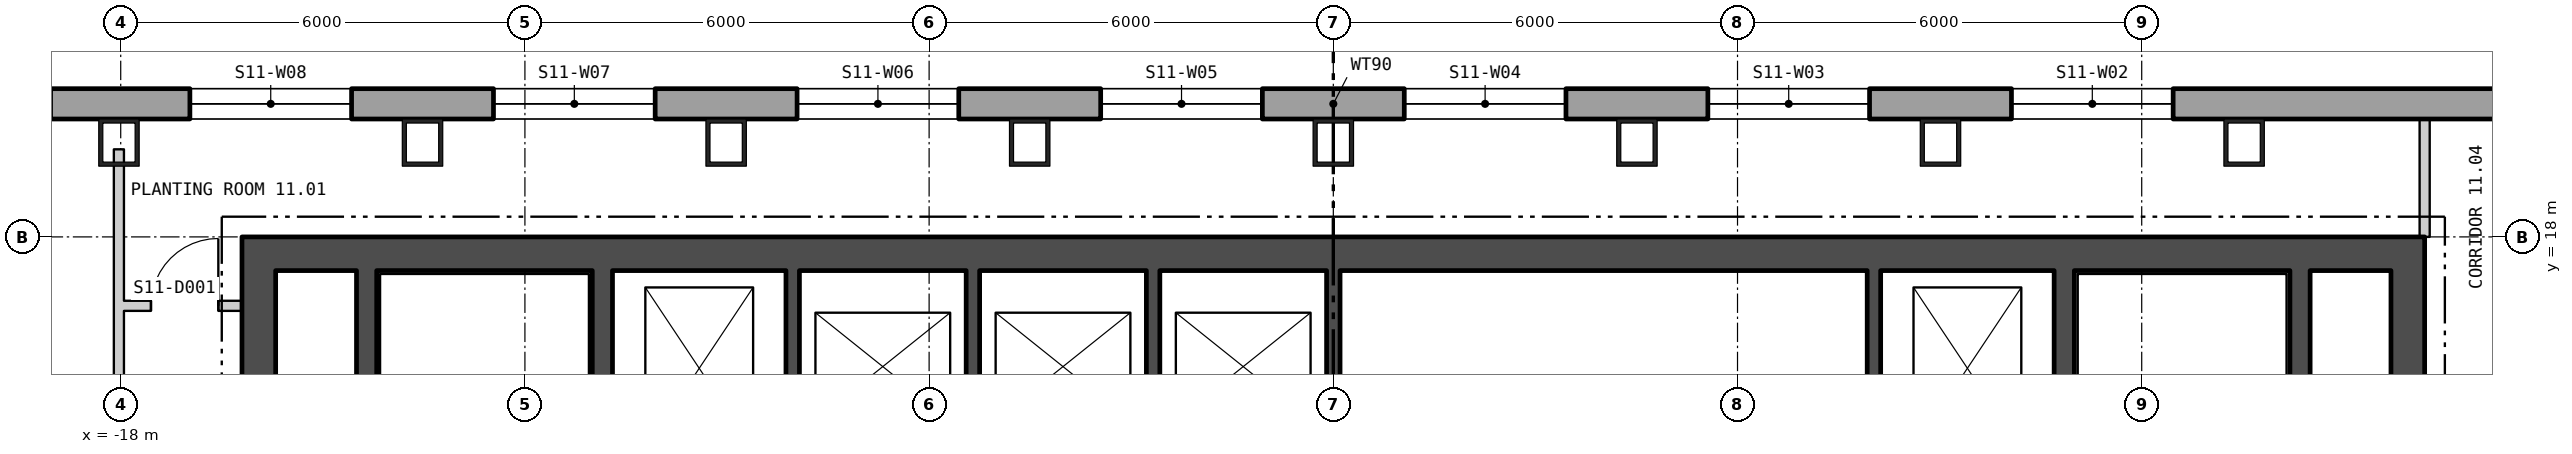
"""IFC4 building model, lengths in metres.
Left out: names, types, materials, properties, quantities, classifications, styles, units other than length and angle.
Written with IfcOpenShell. Run it as: python <this file> out.ifc"""

import sys

from ifc_helpers import new_model, si_unit, direction, frame, frame_2d, origin, origin_2d, place, context, subcontext, project, spatial, polyline, rectangle, hollow_rectangle, outline, extrude, element, fill, save


model = new_model("IFC4")
c1 = context("Model", 3, precision=1e-05, world=origin(), true_north=direction((0.0, 1.0)))
c2 = subcontext(c1, "Body", "Model", "MODEL_VIEW")
j1 = project(units=[si_unit("LENGTHUNIT", "METRE"), si_unit("PLANEANGLEUNIT", "RADIAN")], contexts=[c1])
p1 = place(None, origin())
s1 = spatial("IfcSite", under=j1, at=p1, CompositionType="ELEMENT")
p2 = place(p1, origin())
s2 = spatial("IfcBuilding", under=s1, at=p2, CompositionType="ELEMENT")
p3 = place(p2, frame((0.0, 0.0, 151.5)))
s3 = spatial("IfcBuildingStorey", under=s2, at=p3, CompositionType="ELEMENT", Elevation=151.5)
for number, where, z_axis, x_axis in (
    (1, (13.52, 19.4, 0.0), (0.0, 0.0, 1.0), (-1.0, 0.0, 0.0)),
    (2, (9.013, 19.4, 0.0), (0.0, 0.0, 1.0), (-1.0, 0.0, 0.0)),
    (3, (4.507, 19.4, 0.0), (0.0, 0.0, 1.0), (-1.0, 0.0, 0.0)),
    (4, (0.0, 19.4, 0.0), (0.0, 0.0, 1.0), (-1.0, 0.0, 0.0)),
    (5, (-4.507, 19.4, 0.0), (0.0, 0.0, 1.0), (-1.0, 0.0, 0.0)),
    (6, (-9.013, 19.4, 0.0), (0.0, 0.0, 1.0), (-1.0, 0.0, 0.0)),
    (7, (-13.52, 19.4, 0.0), (0.0, 0.0, 1.0), (-1.0, 0.0, 0.0)),
    (8, (-18.026, 19.4, 0.0), (0.0, 0.0, 1.0), (-1.0, 0.0, 0.0)),
):
    element("IfcColumn", number, at=place(p3, frame(where, z_axis=z_axis, x_axis=x_axis)), inside=s3, PredefinedType="COLUMN", context=c2, shape_type="SweptSolid", body=[
        extrude(hollow_rectangle(XDim=0.6, YDim=0.7, WallThickness=0.06, at=origin_2d()), origin(), (0.0, 0.0, 1.0), 3.9),
    ])
p4 = place(p3, frame((22.865, 19.975, -0.4), z_axis=(0.0, 0.0, 1.0), x_axis=(-1.0, 0.0, 0.0)))
e9 = element("IfcWall", 9, at=p4, inside=s3, PredefinedType="SOLIDWALL", context=c2, shape_type="SweptSolid", body=[
    extrude(outline(polyline([(-0.13, -0.225), (45.86, -0.225), (45.6, 0.225), (0.13, 0.225), (-0.13, -0.225)])), origin(), (0.0, 0.0, 1.0), 3.9),
])
p5 = place(p4, frame((1.424, 0.0, 1.3)))
e10 = element("IfcOpeningElement", 10, at=p5, cuts=e9, PredefinedType="OPENING", context=c2, shape_type="SweptSolid", body=[
    extrude(rectangle(XDim=2.4, YDim=2.0, at=frame_2d((1.2, 1.0))), frame((0.0, 0.235, 0.0), z_axis=(0.0, -1.0, 0.0), x_axis=(1.0, 0.0, 0.0)), (0.0, 0.0, 1.0), 0.47),
])
p6 = place(p4, frame((10.399, 0.0, 1.3)))
e11 = element("IfcOpeningElement", 11, at=p6, cuts=e9, PredefinedType="OPENING", context=c2, shape_type="SweptSolid", body=[
    extrude(rectangle(XDim=2.4, YDim=2.0, at=frame_2d((1.2, 1.0))), frame((0.0, 0.235, 0.0), z_axis=(0.0, -1.0, 0.0), x_axis=(1.0, 0.0, 0.0)), (0.0, 0.0, 1.0), 0.47),
])
p7 = place(p4, frame((14.905, 0.0, 1.3)))
e12 = element("IfcOpeningElement", 12, at=p7, cuts=e9, PredefinedType="OPENING", context=c2, shape_type="SweptSolid", body=[
    extrude(rectangle(XDim=2.4, YDim=2.0, at=frame_2d((1.2, 1.0))), frame((0.0, 0.235, 0.0), z_axis=(0.0, -1.0, 0.0), x_axis=(1.0, 0.0, 0.0)), (0.0, 0.0, 1.0), 0.47),
])
p8 = place(p4, frame((19.412, 0.0, 1.3)))
e13 = element("IfcOpeningElement", 13, at=p8, cuts=e9, PredefinedType="OPENING", context=c2, shape_type="SweptSolid", body=[
    extrude(rectangle(XDim=2.4, YDim=2.0, at=frame_2d((1.2, 1.0))), frame((0.0, 0.235, 0.0), z_axis=(0.0, -1.0, 0.0), x_axis=(1.0, 0.0, 0.0)), (0.0, 0.0, 1.0), 0.47),
])
p9 = place(p4, frame((23.918, 0.0, 1.3)))
e14 = element("IfcOpeningElement", 14, at=p9, cuts=e9, PredefinedType="OPENING", context=c2, shape_type="SweptSolid", body=[
    extrude(rectangle(XDim=2.4, YDim=2.0, at=frame_2d((1.2, 1.0))), frame((0.0, 0.235, 0.0), z_axis=(0.0, -1.0, 0.0), x_axis=(1.0, 0.0, 0.0)), (0.0, 0.0, 1.0), 0.47),
])
p10 = place(p4, frame((28.425, 0.0, 1.3)))
e15 = element("IfcOpeningElement", 15, at=p10, cuts=e9, PredefinedType="OPENING", context=c2, shape_type="SweptSolid", body=[
    extrude(rectangle(XDim=2.4, YDim=2.0, at=frame_2d((1.2, 1.0))), frame((0.0, 0.235, 0.0), z_axis=(0.0, -1.0, 0.0), x_axis=(1.0, 0.0, 0.0)), (0.0, 0.0, 1.0), 0.47),
])
p11 = place(p4, frame((32.932, 0.0, 1.3)))
e16 = element("IfcOpeningElement", 16, at=p11, cuts=e9, PredefinedType="OPENING", context=c2, shape_type="SweptSolid", body=[
    extrude(rectangle(XDim=2.4, YDim=2.0, at=frame_2d((1.2, 1.0))), frame((0.0, 0.235, 0.0), z_axis=(0.0, -1.0, 0.0), x_axis=(1.0, 0.0, 0.0)), (0.0, 0.0, 1.0), 0.47),
])
p12 = place(p4, frame((37.438, 0.0, 1.3)))
e17 = element("IfcOpeningElement", 17, at=p12, cuts=e9, PredefinedType="OPENING", context=c2, shape_type="SweptSolid", body=[
    extrude(rectangle(XDim=2.4, YDim=2.0, at=frame_2d((1.2, 1.0))), frame((0.0, 0.235, 0.0), z_axis=(0.0, -1.0, 0.0), x_axis=(1.0, 0.0, 0.0)), (0.0, 0.0, 1.0), 0.47),
])
p13 = place(p4, frame((41.907, 0.0, 1.3)))
e18 = element("IfcOpeningElement", 18, at=p13, cuts=e9, PredefinedType="OPENING", context=c2, shape_type="SweptSolid", body=[
    extrude(rectangle(XDim=2.4, YDim=2.0, at=frame_2d((1.2, 1.0))), frame((0.0, 0.235, 0.0), z_axis=(0.0, -1.0, 0.0), x_axis=(1.0, 0.0, 0.0)), (0.0, 0.0, 1.0), 0.47),
])
p14 = place(p3, frame((-16.2, 17.75, 0.0), z_axis=(0.0, 0.0, 1.0), x_axis=(1.0, 0.0, 0.0)))
e19 = element("IfcWall", 19, at=p14, inside=s3, PredefinedType="SHEAR", context=c2, shape_type="SweptSolid", body=[
    extrude(rectangle(XDim=32.4, YDim=0.5, at=frame_2d((16.2, 0.0))), origin(), (0.0, 0.0, 1.0), 3.7),
])
p15 = place(p3, frame((-15.95, 2.5, 0.0), z_axis=(0.0, 0.0, 1.0), x_axis=(0.0, 1.0, 0.0)))
e20 = element("IfcWall", 20, at=p15, inside=s3, PredefinedType="SHEAR", context=c2, shape_type="SweptSolid", body=[
    extrude(rectangle(XDim=15.0, YDim=0.5, at=frame_2d((7.5, 0.0))), origin(), (0.0, 0.0, 1.0), 3.7),
])
p16 = place(p15, frame((4.35, 0.0, 0.0)))
e21 = element("IfcOpeningElement", 21, at=p16, cuts=e20, PredefinedType="OPENING", context=c2, shape_type="SweptSolid", body=[
    extrude(rectangle(XDim=1.5, YDim=2.1, at=frame_2d((0.75, 1.05))), frame((0.0, 0.26, 0.0), z_axis=(0.0, -1.0, 0.0), x_axis=(1.0, 0.0, 0.0)), (0.0, 0.0, 1.0), 0.52),
])
p17 = place(p15, frame((0.825, 0.0, 0.0)))
e22 = element("IfcOpeningElement", 22, at=p17, cuts=e20, PredefinedType="OPENING", context=c2, shape_type="SweptSolid", body=[
    extrude(rectangle(XDim=0.9, YDim=2.1, at=frame_2d((0.45, 1.05))), frame((0.0, 0.26, 0.0), z_axis=(0.0, -1.0, 0.0), x_axis=(1.0, 0.0, 0.0)), (0.0, 0.0, 1.0), 0.52),
])
p18 = place(p15, frame((3.0, 0.0, 0.0)))
e23 = element("IfcOpeningElement", 23, at=p18, cuts=e20, PredefinedType="OPENING", context=c2, shape_type="SweptSolid", body=[
    extrude(rectangle(XDim=0.9, YDim=2.1, at=frame_2d((0.45, 1.05))), frame((0.0, 0.26, 0.0), z_axis=(0.0, -1.0, 0.0), x_axis=(1.0, 0.0, 0.0)), (0.0, 0.0, 1.0), 0.52),
])
p19 = place(p15, frame((6.997, 0.0, 0.0)))
e24 = element("IfcOpeningElement", 24, at=p19, cuts=e20, PredefinedType="OPENING", context=c2, shape_type="SweptSolid", body=[
    extrude(rectangle(XDim=1.0, YDim=2.1, at=frame_2d((0.5, 1.05))), frame((0.0, 0.26, 0.0), z_axis=(0.0, -1.0, 0.0), x_axis=(1.0, 0.0, 0.0)), (0.0, 0.0, 1.0), 0.52),
])
p20 = place(p15, frame((11.622, 0.0, 0.0)))
e25 = element("IfcOpeningElement", 25, at=p20, cuts=e20, PredefinedType="OPENING", context=c2, shape_type="SweptSolid", body=[
    extrude(rectangle(XDim=0.9, YDim=2.1, at=frame_2d((0.45, 1.05))), frame((0.0, 0.26, 0.0), z_axis=(0.0, -1.0, 0.0), x_axis=(1.0, 0.0, 0.0)), (0.0, 0.0, 1.0), 0.52),
])
p21 = place(p3, frame((15.95, 2.5, 0.0), z_axis=(0.0, 0.0, 1.0), x_axis=(0.0, 1.0, 0.0)))
e26 = element("IfcWall", 26, at=p21, inside=s3, PredefinedType="SHEAR", context=c2, shape_type="SweptSolid", body=[
    extrude(rectangle(XDim=15.0, YDim=0.5, at=frame_2d((7.5, 0.0))), origin(), (0.0, 0.0, 1.0), 3.7),
])
p22 = place(p21, frame((4.35, 0.0, 0.0)))
e27 = element("IfcOpeningElement", 27, at=p22, cuts=e26, PredefinedType="OPENING", context=c2, shape_type="SweptSolid", body=[
    extrude(rectangle(XDim=1.5, YDim=2.1, at=frame_2d((0.75, 1.05))), frame((0.0, 0.26, 0.0), z_axis=(0.0, -1.0, 0.0), x_axis=(1.0, 0.0, 0.0)), (0.0, 0.0, 1.0), 0.52),
])
p23 = place(p21, frame((0.825, 0.0, 0.0)))
e28 = element("IfcOpeningElement", 28, at=p23, cuts=e26, PredefinedType="OPENING", context=c2, shape_type="SweptSolid", body=[
    extrude(rectangle(XDim=0.9, YDim=2.1, at=frame_2d((0.45, 1.05))), frame((0.0, 0.26, 0.0), z_axis=(0.0, -1.0, 0.0), x_axis=(1.0, 0.0, 0.0)), (0.0, 0.0, 1.0), 0.52),
])
p24 = place(p21, frame((3.0, 0.0, 0.0)))
e29 = element("IfcOpeningElement", 29, at=p24, cuts=e26, PredefinedType="OPENING", context=c2, shape_type="SweptSolid", body=[
    extrude(rectangle(XDim=0.9, YDim=2.1, at=frame_2d((0.45, 1.05))), frame((0.0, 0.26, 0.0), z_axis=(0.0, -1.0, 0.0), x_axis=(1.0, 0.0, 0.0)), (0.0, 0.0, 1.0), 0.52),
])
p25 = place(p21, frame((6.59, 0.0, 0.0)))
e30 = element("IfcOpeningElement", 30, at=p25, cuts=e26, PredefinedType="OPENING", context=c2, shape_type="SweptSolid", body=[
    extrude(rectangle(XDim=1.0, YDim=2.1, at=frame_2d((0.5, 1.05))), frame((0.0, 0.26, 0.0), z_axis=(0.0, -1.0, 0.0), x_axis=(1.0, 0.0, 0.0)), (0.0, 0.0, 1.0), 0.52),
])
p26 = place(p21, frame((11.215, 0.0, 0.0)))
e31 = element("IfcOpeningElement", 31, at=p26, cuts=e26, PredefinedType="OPENING", context=c2, shape_type="SweptSolid", body=[
    extrude(rectangle(XDim=0.9, YDim=2.1, at=frame_2d((0.45, 1.05))), frame((0.0, 0.26, 0.0), z_axis=(0.0, -1.0, 0.0), x_axis=(1.0, 0.0, 0.0)), (0.0, 0.0, 1.0), 0.52),
])
p27 = place(p3, frame((-10.85, 2.5, 0.0), z_axis=(0.0, 0.0, 1.0), x_axis=(0.0, 1.0, 0.0)))
e32 = element("IfcWall", 32, at=p27, inside=s3, PredefinedType="SHEAR", context=c2, shape_type="SweptSolid", body=[
    extrude(rectangle(XDim=15.0, YDim=0.3, at=frame_2d((7.5, 0.0))), origin(), (0.0, 0.0, 1.0), 3.7),
])
p28 = place(p27, frame((3.475, 0.0, 0.0)))
e33 = element("IfcOpeningElement", 33, at=p28, cuts=e32, PredefinedType="OPENING", context=c2, shape_type="SweptSolid", body=[
    extrude(rectangle(XDim=1.25, YDim=2.1, at=frame_2d((0.625, 1.05))), frame((0.0, 0.16, 0.0), z_axis=(0.0, -1.0, 0.0), x_axis=(1.0, 0.0, 0.0)), (0.0, 0.0, 1.0), 0.32),
])
p29 = place(p27, frame((1.125, 0.0, 0.0)))
e34 = element("IfcOpeningElement", 34, at=p29, cuts=e32, PredefinedType="OPENING", context=c2, shape_type="SweptSolid", body=[
    extrude(rectangle(XDim=1.0, YDim=2.1, at=frame_2d((0.5, 1.05))), frame((0.0, 0.16, 0.0), z_axis=(0.0, -1.0, 0.0), x_axis=(1.0, 0.0, 0.0)), (0.0, 0.0, 1.0), 0.32),
])
p30 = place(p3, frame((-14.35, 2.5, 0.0), z_axis=(0.0, 0.0, 1.0), x_axis=(0.0, 1.0, 0.0)))
e35 = element("IfcWall", 35, at=p30, inside=s3, PredefinedType="SHEAR", context=c2, shape_type="SweptSolid", body=[
    extrude(rectangle(XDim=15.0, YDim=0.3, at=frame_2d((7.5, 0.0))), origin(), (0.0, 0.0, 1.0), 3.7),
])
p31 = place(p30, frame((4.35, 0.0, 0.0)))
e36 = element("IfcOpeningElement", 36, at=p31, cuts=e35, PredefinedType="OPENING", context=c2, shape_type="SweptSolid", body=[
    extrude(rectangle(XDim=1.5, YDim=2.1, at=frame_2d((0.75, 1.05))), frame((0.0, 0.16, 0.0), z_axis=(0.0, -1.0, 0.0), x_axis=(1.0, 0.0, 0.0)), (0.0, 0.0, 1.0), 0.32),
])
p32 = place(p3, frame((10.85, 2.5, 0.0), z_axis=(0.0, 0.0, 1.0), x_axis=(0.0, 1.0, 0.0)))
e37 = element("IfcWall", 37, at=p32, inside=s3, PredefinedType="SHEAR", context=c2, shape_type="SweptSolid", body=[
    extrude(rectangle(XDim=15.0, YDim=0.3, at=frame_2d((7.5, 0.0))), origin(), (0.0, 0.0, 1.0), 3.7),
])
p33 = place(p32, frame((3.475, 0.0, 0.0)))
e38 = element("IfcOpeningElement", 38, at=p33, cuts=e37, PredefinedType="OPENING", context=c2, shape_type="SweptSolid", body=[
    extrude(rectangle(XDim=1.25, YDim=2.1, at=frame_2d((0.625, 1.05))), frame((0.0, 0.16, 0.0), z_axis=(0.0, -1.0, 0.0), x_axis=(1.0, 0.0, 0.0)), (0.0, 0.0, 1.0), 0.32),
])
p34 = place(p32, frame((1.125, 0.0, 0.0)))
e39 = element("IfcOpeningElement", 39, at=p34, cuts=e37, PredefinedType="OPENING", context=c2, shape_type="SweptSolid", body=[
    extrude(rectangle(XDim=1.0, YDim=2.1, at=frame_2d((0.5, 1.05))), frame((0.0, 0.16, 0.0), z_axis=(0.0, -1.0, 0.0), x_axis=(1.0, 0.0, 0.0)), (0.0, 0.0, 1.0), 0.32),
])
p35 = place(p3, frame((14.35, 2.5, 0.0), z_axis=(0.0, 0.0, 1.0), x_axis=(0.0, 1.0, 0.0)))
e40 = element("IfcWall", 40, at=p35, inside=s3, PredefinedType="SHEAR", context=c2, shape_type="SweptSolid", body=[
    extrude(rectangle(XDim=15.0, YDim=0.3, at=frame_2d((7.5, 0.0))), origin(), (0.0, 0.0, 1.0), 3.7),
])
p36 = place(p35, frame((4.35, 0.0, 0.0)))
e41 = element("IfcOpeningElement", 41, at=p36, cuts=e40, PredefinedType="OPENING", context=c2, shape_type="SweptSolid", body=[
    extrude(rectangle(XDim=1.5, YDim=2.1, at=frame_2d((0.75, 1.05))), frame((0.0, 0.16, 0.0), z_axis=(0.0, -1.0, 0.0), x_axis=(1.0, 0.0, 0.0)), (0.0, 0.0, 1.0), 0.32),
])
for number, where, z_axis, x_axis in (
    (42, (-8.025, 14.7, 0.0), (0.0, 0.0, 1.0), (0.0, 1.0, 0.0)),
    (43, (-5.35, 14.7, 0.0), (0.0, 0.0, 1.0), (0.0, 1.0, 0.0)),
    (44, (-2.675, 14.7, 0.0), (0.0, 0.0, 1.0), (0.0, 1.0, 0.0)),
    (45, (0.0, 14.7, 0.0), (0.0, 0.0, 1.0), (0.0, 1.0, 0.0)),
    (46, (8.025, 14.7, 0.0), (0.0, 0.0, 1.0), (0.0, 1.0, 0.0)),
):
    element("IfcWall", number, at=place(p3, frame(where, z_axis=z_axis, x_axis=x_axis)), inside=s3, PredefinedType="SHEAR", context=c2, shape_type="SweptSolid", body=[
        extrude(rectangle(XDim=2.8, YDim=0.2, at=frame_2d((1.4, 0.0))), origin(), (0.0, 0.0, 1.0), 3.7),
    ])
p37 = place(p3, frame((-18.027, 12.321, 0.0), z_axis=(0.0, 0.0, 1.0), x_axis=(0.0, 1.0, 0.0)))
e47 = element("IfcWall", 47, at=p37, inside=s3, PredefinedType="PARTITIONING", context=c2, shape_type="SweptSolid", body=[
    extrude(rectangle(XDim=6.979, YDim=0.15, at=frame_2d((3.49, 0.0))), origin(), (0.0, 0.0, 1.0), 3.7),
])
p38 = place(p3, frame((-17.952, 16.977, 0.0), z_axis=(0.0, 0.0, 1.0), x_axis=(1.0, 0.0, 0.0)))
e48 = element("IfcWall", 48, at=p38, inside=s3, PredefinedType="PARTITIONING", context=c2, shape_type="SweptSolid", body=[
    extrude(rectangle(XDim=1.752, YDim=0.15, at=frame_2d((0.876, 0.0))), origin(), (0.0, 0.0, 1.0), 3.7),
])
p39 = place(p38, frame((0.401, 0.0, 0.0)))
e49 = element("IfcOpeningElement", 49, at=p39, cuts=e48, PredefinedType="OPENING", context=c2, shape_type="SweptSolid", body=[
    extrude(rectangle(XDim=1.0, YDim=2.1, at=frame_2d((0.5, 1.05))), frame((0.0, 0.085, 0.0), z_axis=(0.0, -1.0, 0.0), x_axis=(1.0, 0.0, 0.0)), (0.0, 0.0, 1.0), 0.17),
])
p40 = place(p3, frame((16.2, 18.0, 0.0), z_axis=(0.0, 0.0, 1.0), x_axis=(0.0, 1.0, 0.0)))
e50 = element("IfcWall", 50, at=p40, inside=s3, PredefinedType="PARTITIONING", context=c2, shape_type="SweptSolid", body=[
    extrude(rectangle(XDim=1.75, YDim=0.15, at=frame_2d((0.875, 0.0))), origin(), (0.0, 0.0, 1.0), 3.7),
])
p41 = place(p6, origin())
e51 = element("IfcWindow", 51, at=p41, inside=s3, PartitioningType="SINGLE_PANEL", PredefinedType="WINDOW", context=c2, shape_type="SweptSolid", body=[
    extrude(rectangle(XDim=2.4, YDim=2.0, at=frame_2d((1.2, 1.0))), frame((0.0, 0.105, 0.0), z_axis=(0.0, -1.0, 0.0), x_axis=(1.0, 0.0, 0.0)), (0.0, 0.0, 1.0), 0.06),
])
fill(e11, e51)
p42 = place(p7, origin())
e52 = element("IfcWindow", 52, at=p42, inside=s3, PartitioningType="SINGLE_PANEL", PredefinedType="WINDOW", context=c2, shape_type="SweptSolid", body=[
    extrude(rectangle(XDim=2.4, YDim=2.0, at=frame_2d((1.2, 1.0))), frame((0.0, 0.105, 0.0), z_axis=(0.0, -1.0, 0.0), x_axis=(1.0, 0.0, 0.0)), (0.0, 0.0, 1.0), 0.06),
])
fill(e12, e52)
p43 = place(p8, origin())
e53 = element("IfcWindow", 53, at=p43, inside=s3, PartitioningType="SINGLE_PANEL", PredefinedType="WINDOW", context=c2, shape_type="SweptSolid", body=[
    extrude(rectangle(XDim=2.4, YDim=2.0, at=frame_2d((1.2, 1.0))), frame((0.0, 0.105, 0.0), z_axis=(0.0, -1.0, 0.0), x_axis=(1.0, 0.0, 0.0)), (0.0, 0.0, 1.0), 0.06),
])
fill(e13, e53)
p44 = place(p9, origin())
e54 = element("IfcWindow", 54, at=p44, inside=s3, PartitioningType="SINGLE_PANEL", PredefinedType="WINDOW", context=c2, shape_type="SweptSolid", body=[
    extrude(rectangle(XDim=2.4, YDim=2.0, at=frame_2d((1.2, 1.0))), frame((0.0, 0.105, 0.0), z_axis=(0.0, -1.0, 0.0), x_axis=(1.0, 0.0, 0.0)), (0.0, 0.0, 1.0), 0.06),
])
fill(e14, e54)
p45 = place(p10, origin())
e55 = element("IfcWindow", 55, at=p45, inside=s3, PartitioningType="SINGLE_PANEL", PredefinedType="WINDOW", context=c2, shape_type="SweptSolid", body=[
    extrude(rectangle(XDim=2.4, YDim=2.0, at=frame_2d((1.2, 1.0))), frame((0.0, 0.105, 0.0), z_axis=(0.0, -1.0, 0.0), x_axis=(1.0, 0.0, 0.0)), (0.0, 0.0, 1.0), 0.06),
])
fill(e15, e55)
p46 = place(p11, origin())
e56 = element("IfcWindow", 56, at=p46, inside=s3, PartitioningType="SINGLE_PANEL", PredefinedType="WINDOW", context=c2, shape_type="SweptSolid", body=[
    extrude(rectangle(XDim=2.4, YDim=2.0, at=frame_2d((1.2, 1.0))), frame((0.0, 0.105, 0.0), z_axis=(0.0, -1.0, 0.0), x_axis=(1.0, 0.0, 0.0)), (0.0, 0.0, 1.0), 0.06),
])
fill(e16, e56)
p47 = place(p12, origin())
e57 = element("IfcWindow", 57, at=p47, inside=s3, PartitioningType="SINGLE_PANEL", PredefinedType="WINDOW", context=c2, shape_type="SweptSolid", body=[
    extrude(rectangle(XDim=2.4, YDim=2.0, at=frame_2d((1.2, 1.0))), frame((0.0, 0.105, 0.0), z_axis=(0.0, -1.0, 0.0), x_axis=(1.0, 0.0, 0.0)), (0.0, 0.0, 1.0), 0.06),
])
fill(e17, e57)
p48 = place(p39, origin())
e58 = element("IfcDoor", 58, at=p48, inside=s3, OperationType="SINGLE_SWING_LEFT", PredefinedType="DOOR", context=c2, shape_type="SweptSolid", body=[
    extrude(rectangle(XDim=1.0, YDim=2.1, at=frame_2d((0.5, 1.05))), frame((0.0, 0.025, 0.0), z_axis=(0.0, -1.0, 0.0), x_axis=(1.0, 0.0, 0.0)), (0.0, 0.0, 1.0), 0.05),
])
fill(e49, e58)
save(model, sys.argv[1])
